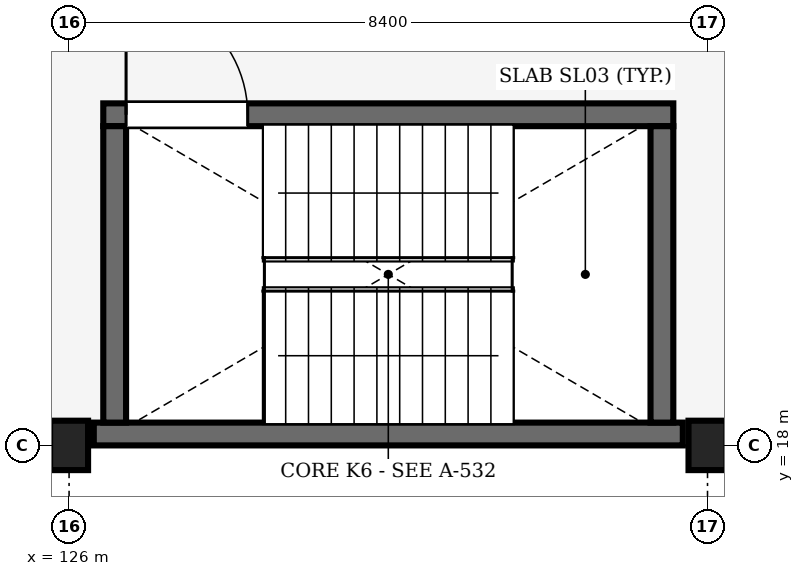
"""IFC4 building model, lengths in metres.
Left out: names, types, materials, properties, quantities, classifications, styles, units other than length and angle.
Written with IfcOpenShell. Run it as: python <this file> out.ifc"""

import sys

from ifc_helpers import new_model, si_unit, direction, frame, frame_2d, origin, origin_2d, place, context, subcontext, project, spatial, rectangle, extrude, element, fill, save


model = new_model("IFC4")
c1 = context("Model", 3, precision=1e-05, world=origin(), true_north=direction((0.0, 1.0)))
c2 = subcontext(c1, "Body", "Model", "MODEL_VIEW")
j1 = project(units=[si_unit("LENGTHUNIT", "METRE"), si_unit("PLANEANGLEUNIT", "RADIAN")], contexts=[c1])
p1 = place(None, origin())
s1 = spatial("IfcSite", under=j1, at=p1, CompositionType="ELEMENT")
p2 = place(p1, origin())
s2 = spatial("IfcBuilding", under=s1, at=p2, CompositionType="ELEMENT")
p3 = place(p2, frame((0.0, 0.0, 4.8)))
s3 = spatial("IfcBuildingStorey", under=s2, at=p3, CompositionType="ELEMENT", Elevation=4.8)
for number, where, z_axis, x_axis in (
    (1, (126.0, 18.0, 0.0), (0.0, 0.0, 1.0), (1.0, 0.0, 0.0)),
    (2, (134.4, 18.0, 0.0), (0.0, 0.0, 1.0), (1.0, 0.0, 0.0)),
):
    element("IfcColumn", number, at=place(p3, frame(where, z_axis=z_axis, x_axis=x_axis)), inside=s3, PredefinedType="COLUMN", context=c2, shape_type="SweptSolid", body=[
        extrude(rectangle(XDim=0.5, YDim=0.65, at=origin_2d()), origin(), (0.0, 0.0, 1.0), 4.2),
    ])
p4 = place(p3, frame((126.325, 18.15, 0.0), z_axis=(0.0, 0.0, 1.0), x_axis=(1.0, 0.0, 0.0)))
e3 = element("IfcWall", 3, at=p4, inside=s3, PredefinedType="SHEAR", context=c2, shape_type="SweptSolid", body=[
    extrude(rectangle(XDim=7.75, YDim=0.3, at=frame_2d((3.875, 0.0))), origin(), (0.0, 0.0, 1.0), 4.025),
])
p5 = place(p3, frame((126.45, 22.35, 0.0), z_axis=(0.0, 0.0, 1.0), x_axis=(1.0, 0.0, 0.0)))
e4 = element("IfcWall", 4, at=p5, inside=s3, PredefinedType="SHEAR", context=c2, shape_type="SweptSolid", body=[
    extrude(rectangle(XDim=7.5, YDim=0.3, at=frame_2d((3.75, 0.0))), origin(), (0.0, 0.0, 1.0), 4.025),
])
p6 = place(p5, frame((0.3, 0.0, 0.0)))
e5 = element("IfcOpeningElement", 5, at=p6, cuts=e4, PredefinedType="OPENING", context=c2, shape_type="SweptSolid", body=[
    extrude(rectangle(XDim=1.6, YDim=2.2, at=frame_2d((0.8, 1.1))), frame((0.0, 0.16, 0.0), z_axis=(0.0, -1.0, 0.0), x_axis=(1.0, 0.0, 0.0)), (0.0, 0.0, 1.0), 0.32),
])
for number, where, z_axis, x_axis in (
    (6, (126.6, 18.3, 0.0), (0.0, 0.0, 1.0), (0.0, 1.0, 0.0)),
    (7, (133.8, 18.3, 0.0), (0.0, 0.0, 1.0), (0.0, 1.0, 0.0)),
):
    element("IfcWall", number, at=place(p3, frame(where, z_axis=z_axis, x_axis=x_axis)), inside=s3, PredefinedType="SHEAR", context=c2, shape_type="SweptSolid", body=[
        extrude(rectangle(XDim=3.9, YDim=0.3, at=frame_2d((1.95, 0.0))), origin(), (0.0, 0.0, 1.0), 4.025),
    ])
p7 = place(p6, origin())
e8 = element("IfcDoor", 8, at=p7, inside=s3, OperationType="DOUBLE_DOOR_SINGLE_SWING", PredefinedType="DOOR", context=c2, shape_type="SweptSolid", body=[
    extrude(rectangle(XDim=1.6, YDim=2.2, at=frame_2d((0.8, 1.1))), frame((0.0, 0.025, 0.0), z_axis=(0.0, -1.0, 0.0), x_axis=(1.0, 0.0, 0.0)), (0.0, 0.0, 1.0), 0.05),
])
fill(e5, e8)
save(model, sys.argv[1])
